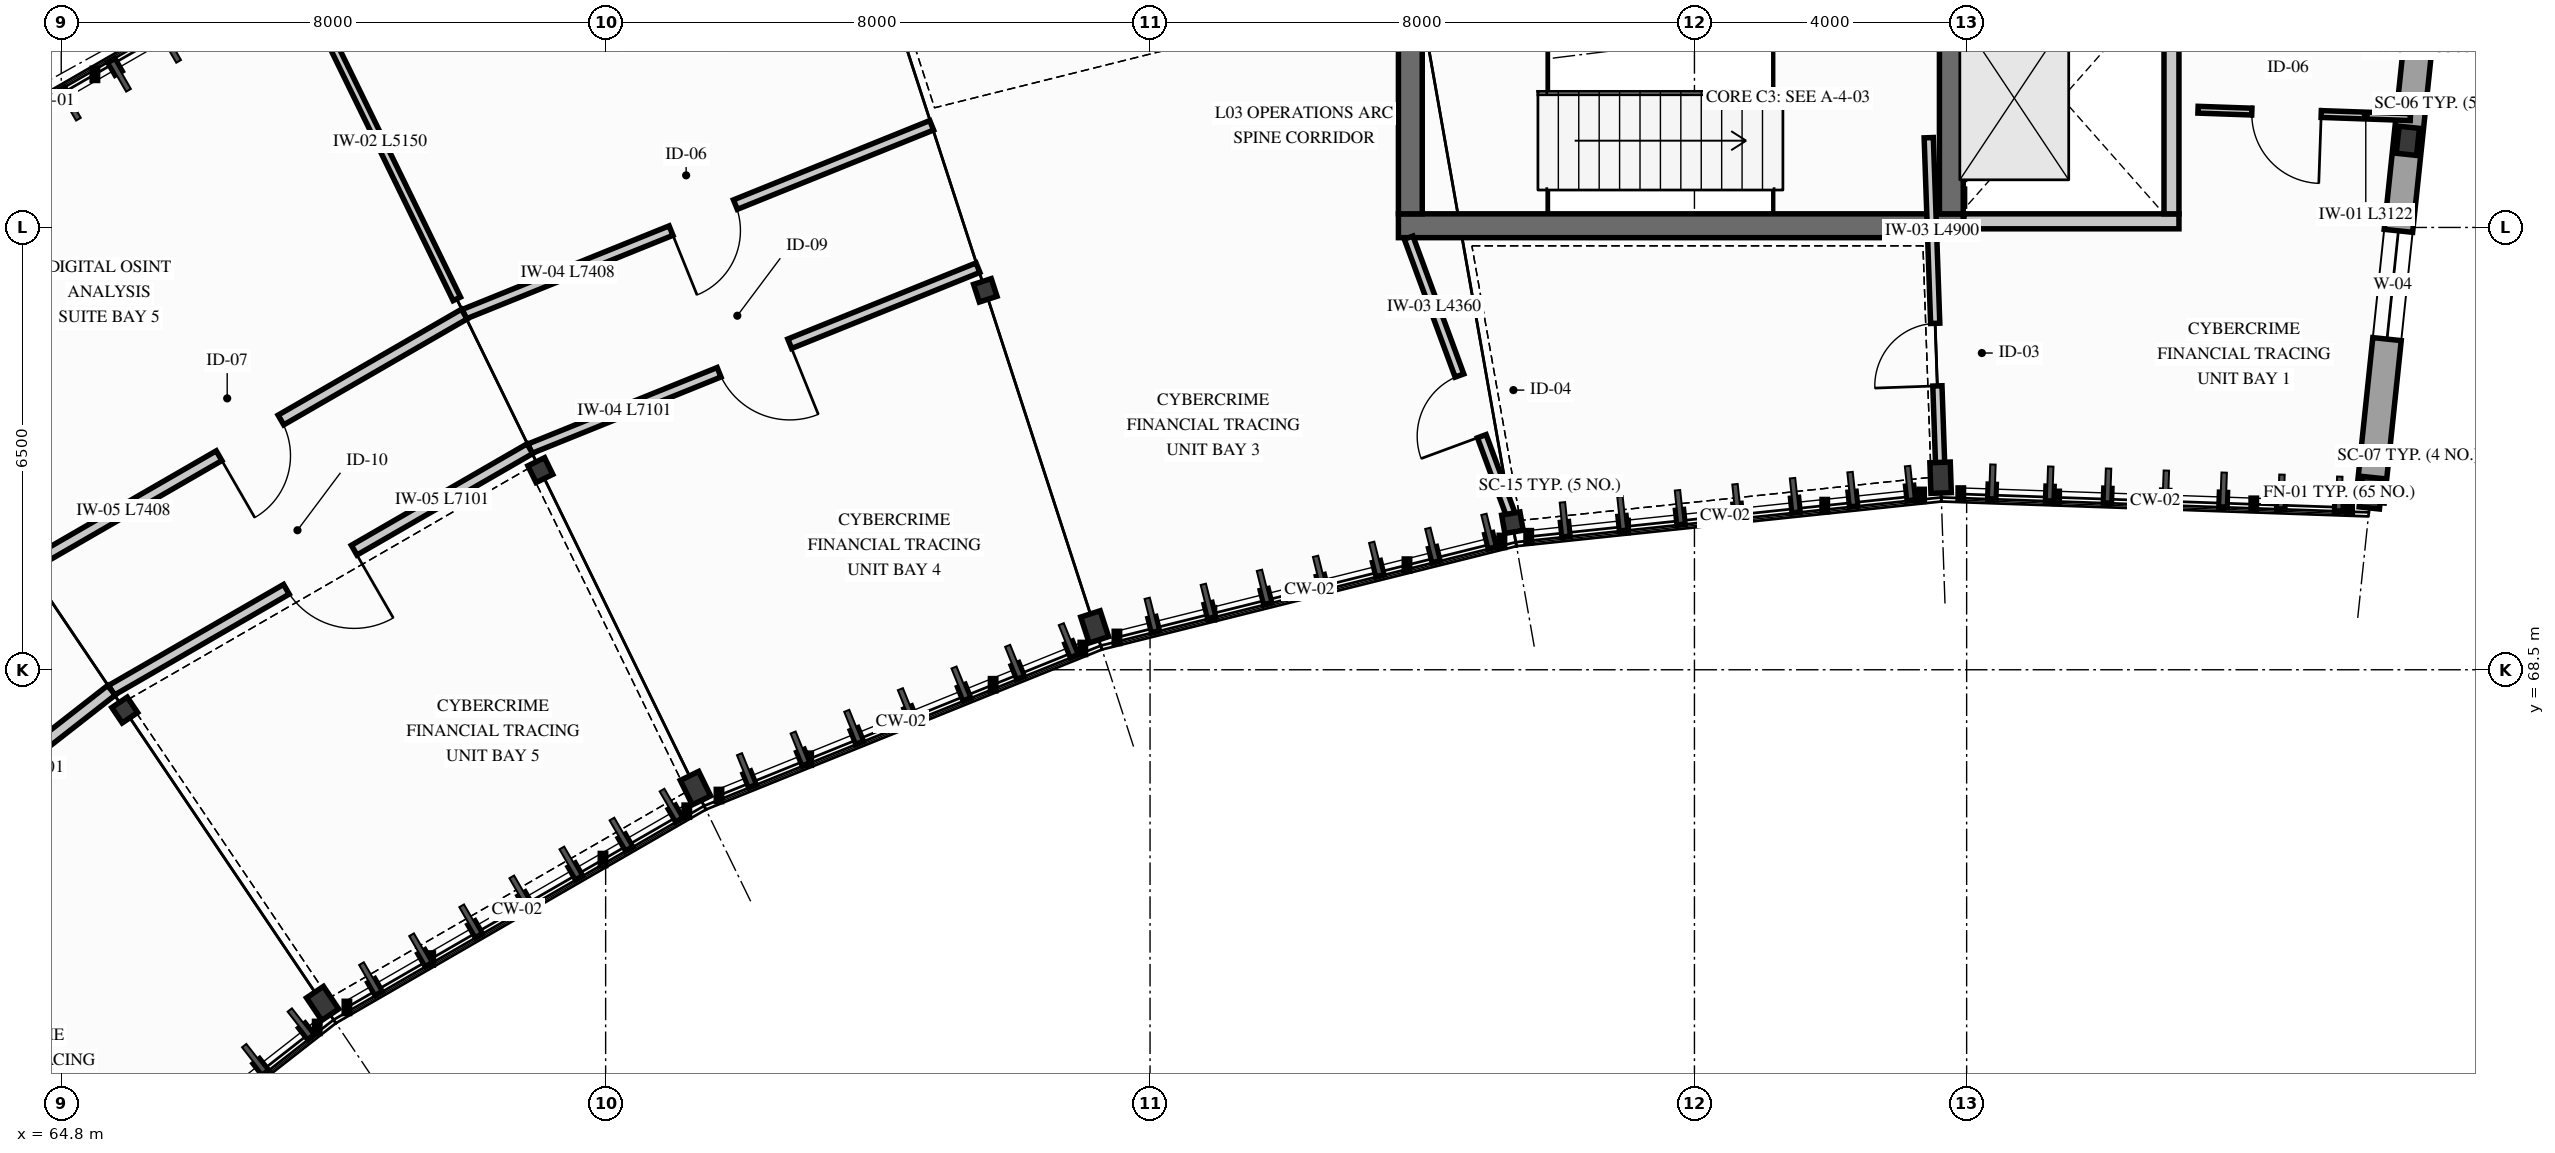
"""IFC4 building model, lengths in metres.
Left out: names, types, materials, properties, quantities, classifications, styles, units other than length and angle.
Written with IfcOpenShell. Run it as: python <this file> out.ifc"""

import sys

from ifc_helpers import new_model, si_unit, direction, frame, frame_2d, origin, origin_2d, place, context, subcontext, project, spatial, rectangle, hollow_circle, i_section, extrude, element, fill, save


model = new_model("IFC4")
c1 = context("Model", 3, precision=1e-05, world=origin(), true_north=direction((0.0, 1.0)))
c2 = subcontext(c1, "Body", "Model", "MODEL_VIEW")
j1 = project(units=[si_unit("LENGTHUNIT", "METRE"), si_unit("PLANEANGLEUNIT", "RADIAN")], contexts=[c1])
p1 = place(None, origin())
s1 = spatial("IfcSite", under=j1, at=p1, CompositionType="ELEMENT")
p2 = place(p1, origin())
s2 = spatial("IfcBuilding", under=s1, at=p2, CompositionType="ELEMENT")
p3 = place(p2, frame((0.0, 0.0, 13.5)))
s3 = spatial("IfcBuildingStorey", under=s2, at=p3, CompositionType="ELEMENT", Elevation=13.5)
p4 = place(p3, frame((84.45, 75.025, 0.0), z_axis=(0.0, 0.0, 1.0), x_axis=(1.0, 0.0, 0.0)))
e1 = element("IfcWall", 1, at=p4, inside=s3, PredefinedType="SHEAR", context=c2, shape_type="SweptSolid", body=[
    extrude(rectangle(XDim=8.3, YDim=0.35, at=frame_2d((4.15, 0.0))), origin(), (0.0, 0.0, 1.0), 4.0),
])
p5 = place(p3, frame((84.625, 75.2, 0.0), z_axis=(0.0, 0.0, 1.0), x_axis=(0.0, 1.0, 0.0)))
e2 = element("IfcWall", 2, at=p5, inside=s3, PredefinedType="SHEAR", context=c2, shape_type="SweptSolid", body=[
    extrude(rectangle(XDim=6.8, YDim=0.35, at=frame_2d((3.4, 0.0))), origin(), (0.0, 0.0, 1.0), 4.0),
])
p6 = place(p5, frame((2.6, 0.0, 0.0)))
e3 = element("IfcOpeningElement", 3, at=p6, cuts=e2, PredefinedType="OPENING", context=c2, shape_type="SweptSolid", body=[
    extrude(rectangle(XDim=1.25, YDim=2.2, at=frame_2d((0.625, 1.1))), frame((0.0, 0.185, 0.0), z_axis=(0.0, -1.0, 0.0), x_axis=(1.0, 0.0, 0.0)), (0.0, 0.0, 1.0), 0.37),
])
p7 = place(p3, frame((92.575, 75.2, 0.0), z_axis=(0.0, 0.0, 1.0), x_axis=(0.0, 1.0, 0.0)))
e4 = element("IfcWall", 4, at=p7, inside=s3, PredefinedType="SHEAR", context=c2, shape_type="SweptSolid", body=[
    extrude(rectangle(XDim=6.8, YDim=0.35, at=frame_2d((3.4, 0.0))), origin(), (0.0, 0.0, 1.0), 4.0),
])
p8 = place(p3, frame((98.74, 71.102, 0.0), z_axis=(0.0, 0.0, 1.0), x_axis=(0.994521895368, -0.104528463268, 0.0)))
e5 = element("IfcColumn", 5, at=p8, inside=s3, PredefinedType="COLUMN", context=c2, shape_type="SweptSolid", body=[
    extrude(i_section(OverallWidth=0.3, OverallDepth=0.45, WebThickness=0.014, FlangeThickness=0.026, FilletRadius=0.027, at=origin_2d()), origin(), (0.0, 0.0, 1.0), 4.2),
])
p9 = place(p3, frame((99.284, 76.273, 0.0), z_axis=(0.0, 0.0, 1.0), x_axis=(0.994521895368, -0.104528463268, 0.0)))
e6 = element("IfcColumn", 6, at=p9, inside=s3, PredefinedType="COLUMN", context=c2, shape_type="SweptSolid", body=[
    extrude(i_section(OverallWidth=0.3, OverallDepth=0.4, WebThickness=0.013, FlangeThickness=0.024, FilletRadius=0.027, at=origin_2d()), origin(), (0.0, 0.0, 1.0), 4.2),
])
p10 = place(p3, frame((92.417, 71.323, 0.0), z_axis=(0.0, 0.0, 1.0), x_axis=(0.999390827019, 0.034899496703, 0.0)))
e7 = element("IfcColumn", 7, at=p10, inside=s3, PredefinedType="COLUMN", context=c2, shape_type="SweptSolid", body=[
    extrude(i_section(OverallWidth=0.3, OverallDepth=0.45, WebThickness=0.014, FlangeThickness=0.026, FilletRadius=0.027, at=origin_2d()), origin(), (0.0, 0.0, 1.0), 4.2),
])
p11 = place(p3, frame((86.125, 70.661, 0.0), z_axis=(0.0, 0.0, 1.0), x_axis=(0.984807753012, 0.173648177667, 0.0)))
e8 = element("IfcColumn", 8, at=p11, inside=s3, PredefinedType="COLUMN", context=c2, shape_type="SweptSolid", body=[
    extrude(hollow_circle(Radius=0.136, WallThickness=0.012, at=origin_2d()), origin(), (0.0, 0.0, 1.0), 4.2),
])
p12 = place(p3, frame((79.986, 69.13, 0.0), z_axis=(0.0, 0.0, 1.0), x_axis=(0.951056516295, 0.309016994375, 0.0)))
e9 = element("IfcColumn", 9, at=p12, inside=s3, PredefinedType="COLUMN", context=c2, shape_type="SweptSolid", body=[
    extrude(i_section(OverallWidth=0.3, OverallDepth=0.4, WebThickness=0.013, FlangeThickness=0.024, FilletRadius=0.027, at=origin_2d()), origin(), (0.0, 0.0, 1.0), 4.2),
])
p13 = place(p3, frame((78.379, 74.076, 0.0), z_axis=(0.0, 0.0, 1.0), x_axis=(0.951056516295, 0.309016994375, 0.0)))
e10 = element("IfcColumn", 10, at=p13, inside=s3, PredefinedType="COLUMN", context=c2, shape_type="SweptSolid", body=[
    extrude(hollow_circle(Radius=0.136, WallThickness=0.012, at=origin_2d()), origin(), (0.0, 0.0, 1.0), 4.2),
])
p14 = place(p3, frame((74.12, 66.76, 0.0), z_axis=(0.0, 0.0, 1.0), x_axis=(0.898794046299, 0.438371146789, 0.0)))
e11 = element("IfcColumn", 11, at=p14, inside=s3, PredefinedType="COLUMN", context=c2, shape_type="SweptSolid", body=[
    extrude(i_section(OverallWidth=0.3, OverallDepth=0.4, WebThickness=0.013, FlangeThickness=0.024, FilletRadius=0.027, at=origin_2d()), origin(), (0.0, 0.0, 1.0), 4.2),
])
p15 = place(p3, frame((71.84, 71.434, 0.0), z_axis=(0.0, 0.0, 1.0), x_axis=(0.898794046299, 0.438371146789, 0.0)))
e12 = element("IfcColumn", 12, at=p15, inside=s3, PredefinedType="COLUMN", context=c2, shape_type="SweptSolid", body=[
    extrude(hollow_circle(Radius=0.136, WallThickness=0.012, at=origin_2d()), origin(), (0.0, 0.0, 1.0), 4.2),
])
p16 = place(p3, frame((68.641, 63.597, 0.0), z_axis=(0.0, 0.0, 1.0), x_axis=(0.829037572555, 0.559192903471, 0.0)))
e13 = element("IfcColumn", 13, at=p16, inside=s3, PredefinedType="COLUMN", context=c2, shape_type="SweptSolid", body=[
    extrude(i_section(OverallWidth=0.3, OverallDepth=0.4, WebThickness=0.013, FlangeThickness=0.024, FilletRadius=0.027, at=origin_2d()), origin(), (0.0, 0.0, 1.0), 4.2),
])
p17 = place(p3, frame((65.733, 67.908, 0.0), z_axis=(0.0, 0.0, 1.0), x_axis=(0.829037572555, 0.559192903471, 0.0)))
e14 = element("IfcColumn", 14, at=p17, inside=s3, PredefinedType="COLUMN", context=c2, shape_type="SweptSolid", body=[
    extrude(hollow_circle(Radius=0.136, WallThickness=0.012, at=origin_2d()), origin(), (0.0, 0.0, 1.0), 4.2),
])
p18 = place(p3, frame((98.727, 70.972, 0.0), z_axis=(0.0, 0.0, 1.0), x_axis=(0.104534827036, 0.994521226489, 0.0)))
e15 = element("IfcWall", 15, at=p18, inside=s3, PredefinedType="SOLIDWALL", context=c2, shape_type="SweptSolid", body=[
    extrude(rectangle(XDim=13.56, YDim=0.42, at=frame_2d((6.78, 0.0))), origin(), (0.0, 0.0, 1.0), 3.55),
])
p19 = place(p18, frame((2.4, 0.0, 0.74)))
e16 = element("IfcOpeningElement", 16, at=p19, cuts=e15, PredefinedType="OPENING", context=c2, shape_type="SweptSolid", body=[
    extrude(rectangle(XDim=1.6, YDim=2.4, at=frame_2d((0.8, 1.2))), frame((0.0, 0.22, 0.0), z_axis=(0.0, -1.0, 0.0), x_axis=(1.0, 0.0, 0.0)), (0.0, 0.0, 1.0), 0.44),
])
p20 = place(p18, frame((9.4, 0.0, 0.74)))
e17 = element("IfcOpeningElement", 17, at=p20, cuts=e15, PredefinedType="OPENING", context=c2, shape_type="SweptSolid", body=[
    extrude(rectangle(XDim=1.6, YDim=2.4, at=frame_2d((0.8, 1.2))), frame((0.0, 0.22, 0.0), z_axis=(0.0, -1.0, 0.0), x_axis=(1.0, 0.0, 0.0)), (0.0, 0.0, 1.0), 0.44),
])
p21 = place(p3, frame((92.76, 75.09, 0.0), z_axis=(0.0, 0.0, 1.0), x_axis=(1.0, 0.0, 0.0)))
e18 = element("IfcWall", 18, at=p21, inside=s3, PredefinedType="PARTITIONING", context=c2, shape_type="SweptSolid", body=[
    extrude(rectangle(XDim=3.16, YDim=0.22, at=frame_2d((1.58, 0.0))), origin(), (0.0, 0.0, 1.0), 3.98),
])
p22 = place(p3, frame((95.81, 75.2, 0.0), z_axis=(0.0, 0.0, 1.0), x_axis=(0.0, 1.0, 0.0)))
e19 = element("IfcWall", 19, at=p22, inside=s3, PredefinedType="PARTITIONING", context=c2, shape_type="SweptSolid", body=[
    extrude(rectangle(XDim=3.4, YDim=0.22, at=frame_2d((1.7, 0.0))), origin(), (0.0, 0.0, 1.0), 3.98),
])
p23 = place(p3, frame((92.414, 71.422, 0.0), z_axis=(0.0, 0.0, 1.0), x_axis=(-0.034877560821, 0.999391592796, 0.0)))
e20 = element("IfcWall", 20, at=p23, inside=s3, PredefinedType="PARTITIONING", context=c2, shape_type="SweptSolid", body=[
    extrude(rectangle(XDim=4.9, YDim=0.135, at=frame_2d((2.45, 0.0))), origin(), (0.0, 0.0, 1.0), 3.98),
])
p24 = place(p23, frame((1.25, 0.0, 0.0)))
e21 = element("IfcOpeningElement", 21, at=p24, cuts=e20, PredefinedType="OPENING", context=c2, shape_type="SweptSolid", body=[
    extrude(rectangle(XDim=0.92, YDim=2.12, at=frame_2d((0.46, 1.06))), frame((0.0, 0.077, 0.0), z_axis=(0.0, -1.0, 0.0), x_axis=(1.0, 0.0, 0.0)), (0.0, 0.0, 1.0), 0.155),
])
p25 = place(p3, frame((86.108, 70.76, 0.0), z_axis=(0.0, 0.0, 1.0), x_axis=(-0.345809164341, 0.938304866159, 0.0)))
e22 = element("IfcWall", 22, at=p25, inside=s3, PredefinedType="PARTITIONING", context=c2, shape_type="SweptSolid", body=[
    extrude(rectangle(XDim=4.36, YDim=0.135, at=frame_2d((2.18, 0.0))), origin(), (0.0, 0.0, 1.0), 3.98),
])
p26 = place(p25, frame((1.25, 0.0, 0.0)))
e23 = element("IfcOpeningElement", 23, at=p26, cuts=e22, PredefinedType="OPENING", context=c2, shape_type="SweptSolid", body=[
    extrude(rectangle(XDim=0.95, YDim=2.15, at=frame_2d((0.475, 1.075))), frame((0.0, 0.077, 0.0), z_axis=(0.0, -1.0, 0.0), x_axis=(1.0, 0.0, 0.0)), (0.0, 0.0, 1.0), 0.155),
])
p27 = place(p3, frame((99.321, 76.621, 0.0), z_axis=(0.0, 0.0, 1.0), x_axis=(-0.999389073029, 0.034949688284, 0.0)))
e24 = element("IfcWall", 24, at=p27, inside=s3, PredefinedType="PARTITIONING", context=c2, shape_type="SweptSolid", body=[
    extrude(rectangle(XDim=3.123, YDim=0.1, at=frame_2d((1.561, 0.0))), origin(), (0.0, 0.0, 1.0), 3.98),
])
p28 = place(p27, frame((1.311, 0.0, 0.0)))
e25 = element("IfcOpeningElement", 25, at=p28, cuts=e24, PredefinedType="OPENING", context=c2, shape_type="SweptSolid", body=[
    extrude(rectangle(XDim=1.02, YDim=2.18, at=frame_2d((0.51, 1.09))), frame((0.0, 0.06, 0.0), z_axis=(0.0, -1.0, 0.0), x_axis=(1.0, 0.0, 0.0)), (0.0, 0.0, 1.0), 0.12),
])
p29 = place(p3, frame((78.271, 74.409, 0.0), z_axis=(0.0, 0.0, 1.0), x_axis=(-0.927181218568, -0.374613117677, 0.0)))
e26 = element("IfcWall", 26, at=p29, inside=s3, PredefinedType="PARTITIONING", context=c2, shape_type="SweptSolid", body=[
    extrude(rectangle(XDim=7.101, YDim=0.15, at=frame_2d((3.551, 0.0))), origin(), (0.0, 0.0, 1.0), 3.98),
])
p30 = place(p29, frame((2.983, 0.0, 0.0)))
e27 = element("IfcOpeningElement", 27, at=p30, cuts=e26, PredefinedType="OPENING", context=c2, shape_type="SweptSolid", body=[
    extrude(rectangle(XDim=1.12, YDim=2.2, at=frame_2d((0.56, 1.1))), frame((0.0, 0.085, 0.0), z_axis=(0.0, -1.0, 0.0), x_axis=(1.0, 0.0, 0.0)), (0.0, 0.0, 1.0), 0.17),
])
p31 = place(p3, frame((77.591, 76.501, 0.0), z_axis=(0.0, 0.0, 1.0), x_axis=(-0.927187035022, -0.374598721418, 0.0)))
e28 = element("IfcWall", 28, at=p31, inside=s3, PredefinedType="PARTITIONING", context=c2, shape_type="SweptSolid", body=[
    extrude(rectangle(XDim=7.408, YDim=0.15, at=frame_2d((3.704, 0.0))), origin(), (0.0, 0.0, 1.0), 3.98),
])
p32 = place(p31, frame((3.111, 0.0, 0.0)))
e29 = element("IfcOpeningElement", 29, at=p32, cuts=e28, PredefinedType="OPENING", context=c2, shape_type="SweptSolid", body=[
    extrude(rectangle(XDim=1.02, YDim=2.18, at=frame_2d((0.51, 1.09))), frame((0.0, 0.085, 0.0), z_axis=(0.0, -1.0, 0.0), x_axis=(1.0, 0.0, 0.0)), (0.0, 0.0, 1.0), 0.17),
])
p33 = place(p3, frame((70.613, 73.951, 0.0), z_axis=(0.0, 0.0, 1.0), x_axis=(-0.438355450259, 0.898801701839, 0.0)))
e30 = element("IfcWall", 30, at=p33, inside=s3, PredefinedType="PARTITIONING", context=c2, shape_type="SweptSolid", body=[
    extrude(rectangle(XDim=5.15, YDim=0.12, at=frame_2d((2.575, 0.0))), origin(), (0.0, 0.0, 1.0), 3.55),
])
p34 = place(p3, frame((71.687, 71.749, 0.0), z_axis=(0.0, 0.0, 1.0), x_axis=(-0.866032151687, -0.499988312107, 0.0)))
e31 = element("IfcWall", 31, at=p34, inside=s3, PredefinedType="PARTITIONING", context=c2, shape_type="SweptSolid", body=[
    extrude(rectangle(XDim=7.101, YDim=0.165, at=frame_2d((3.551, 0.0))), origin(), (0.0, 0.0, 1.0), 3.98),
])
p35 = place(p34, frame((2.982, 0.0, 0.0)))
e32 = element("IfcOpeningElement", 32, at=p35, cuts=e31, PredefinedType="OPENING", context=c2, shape_type="SweptSolid", body=[
    extrude(rectangle(XDim=1.15, YDim=2.2, at=frame_2d((0.575, 1.1))), frame((0.0, 0.093, 0.0), z_axis=(0.0, -1.0, 0.0), x_axis=(1.0, 0.0, 0.0)), (0.0, 0.0, 1.0), 0.185),
])
p36 = place(p3, frame((70.722, 73.726, 0.0), z_axis=(0.0, 0.0, 1.0), x_axis=(-0.866019843608, -0.500009630384, 0.0)))
e33 = element("IfcWall", 33, at=p36, inside=s3, PredefinedType="PARTITIONING", context=c2, shape_type="SweptSolid", body=[
    extrude(rectangle(XDim=7.408, YDim=0.165, at=frame_2d((3.704, 0.0))), origin(), (0.0, 0.0, 1.0), 3.98),
])
p37 = place(p36, frame((3.111, 0.0, 0.0)))
e34 = element("IfcOpeningElement", 34, at=p37, cuts=e33, PredefinedType="OPENING", context=c2, shape_type="SweptSolid", body=[
    extrude(rectangle(XDim=1.05, YDim=2.2, at=frame_2d((0.525, 1.1))), frame((0.0, 0.093, 0.0), z_axis=(0.0, -1.0, 0.0), x_axis=(1.0, 0.0, 0.0)), (0.0, 0.0, 1.0), 0.185),
])
p38 = place(p3, frame((65.537, 68.198, 0.0), z_axis=(0.0, 0.0, 1.0), x_axis=(-0.788011863809, -0.615660054329, 0.0)))
e35 = element("IfcWall", 35, at=p38, inside=s3, PredefinedType="PARTITIONING", context=c2, shape_type="SweptSolid", body=[
    extrude(rectangle(XDim=7.101, YDim=0.18, at=frame_2d((3.551, 0.0))), origin(), (0.0, 0.0, 1.0), 3.98),
])
p39 = place(p38, frame((2.982, 0.0, 0.0)))
e36 = element("IfcOpeningElement", 36, at=p39, cuts=e35, PredefinedType="OPENING", context=c2, shape_type="SweptSolid", body=[
    extrude(rectangle(XDim=1.18, YDim=2.24, at=frame_2d((0.59, 1.12))), frame((0.0, 0.1, 0.0), z_axis=(0.0, -1.0, 0.0), x_axis=(1.0, 0.0, 0.0)), (0.0, 0.0, 1.0), 0.2),
])
p40 = place(p19, origin())
e37 = element("IfcWindow", 37, at=p40, inside=s3, PartitioningType="SINGLE_PANEL", PredefinedType="WINDOW", context=c2, shape_type="SweptSolid", body=[
    extrude(rectangle(XDim=1.6, YDim=2.4, at=frame_2d((0.8, 1.2))), frame((0.0, 0.03, 0.0), z_axis=(0.0, -1.0, 0.0), x_axis=(1.0, 0.0, 0.0)), (0.0, 0.0, 1.0), 0.06),
])
fill(e16, e37)
p41 = place(p24, origin())
e38 = element("IfcDoor", 38, at=p41, inside=s3, OperationType="SINGLE_SWING_LEFT", PredefinedType="DOOR", context=c2, shape_type="SweptSolid", body=[
    extrude(rectangle(XDim=0.92, YDim=2.12, at=frame_2d((0.46, 1.06))), frame((0.0, 0.025, 0.0), z_axis=(0.0, -1.0, 0.0), x_axis=(1.0, 0.0, 0.0)), (0.0, 0.0, 1.0), 0.05),
])
fill(e21, e38)
p42 = place(p26, origin())
e39 = element("IfcDoor", 39, at=p42, inside=s3, OperationType="SINGLE_SWING_LEFT", PredefinedType="DOOR", context=c2, shape_type="SweptSolid", body=[
    extrude(rectangle(XDim=0.95, YDim=2.15, at=frame_2d((0.475, 1.075))), frame((0.0, 0.025, 0.0), z_axis=(0.0, -1.0, 0.0), x_axis=(1.0, 0.0, 0.0)), (0.0, 0.0, 1.0), 0.05),
])
fill(e23, e39)
p43 = place(p28, origin())
e40 = element("IfcDoor", 40, at=p43, inside=s3, OperationType="SINGLE_SWING_LEFT", PredefinedType="DOOR", context=c2, shape_type="SweptSolid", body=[
    extrude(rectangle(XDim=1.02, YDim=2.18, at=frame_2d((0.51, 1.09))), frame((0.0, 0.025, 0.0), z_axis=(0.0, -1.0, 0.0), x_axis=(1.0, 0.0, 0.0)), (0.0, 0.0, 1.0), 0.05),
])
fill(e25, e40)
p44 = place(p30, origin())
e41 = element("IfcDoor", 41, at=p44, inside=s3, OperationType="SINGLE_SWING_LEFT", PredefinedType="DOOR", context=c2, shape_type="SweptSolid", body=[
    extrude(rectangle(XDim=1.12, YDim=2.2, at=frame_2d((0.56, 1.1))), frame((0.0, 0.025, 0.0), z_axis=(0.0, -1.0, 0.0), x_axis=(1.0, 0.0, 0.0)), (0.0, 0.0, 1.0), 0.05),
])
fill(e27, e41)
p45 = place(p32, origin())
e42 = element("IfcDoor", 42, at=p45, inside=s3, OperationType="SINGLE_SWING_RIGHT", PredefinedType="DOOR", context=c2, shape_type="SweptSolid", body=[
    extrude(rectangle(XDim=1.02, YDim=2.18, at=frame_2d((0.51, 1.09))), frame((0.0, 0.025, 0.0), z_axis=(0.0, -1.0, 0.0), x_axis=(1.0, 0.0, 0.0)), (0.0, 0.0, 1.0), 0.05),
])
fill(e29, e42)
p46 = place(p35, origin())
e43 = element("IfcDoor", 43, at=p46, inside=s3, OperationType="SINGLE_SWING_LEFT", PredefinedType="DOOR", context=c2, shape_type="SweptSolid", body=[
    extrude(rectangle(XDim=1.15, YDim=2.2, at=frame_2d((0.575, 1.1))), frame((0.0, 0.025, 0.0), z_axis=(0.0, -1.0, 0.0), x_axis=(1.0, 0.0, 0.0)), (0.0, 0.0, 1.0), 0.05),
])
fill(e32, e43)
p47 = place(p37, origin())
e44 = element("IfcDoor", 44, at=p47, inside=s3, OperationType="SINGLE_SWING_RIGHT", PredefinedType="DOOR", context=c2, shape_type="SweptSolid", body=[
    extrude(rectangle(XDim=1.05, YDim=2.2, at=frame_2d((0.525, 1.1))), frame((0.0, 0.025, 0.0), z_axis=(0.0, -1.0, 0.0), x_axis=(1.0, 0.0, 0.0)), (0.0, 0.0, 1.0), 0.05),
])
fill(e34, e44)
save(model, sys.argv[1])
